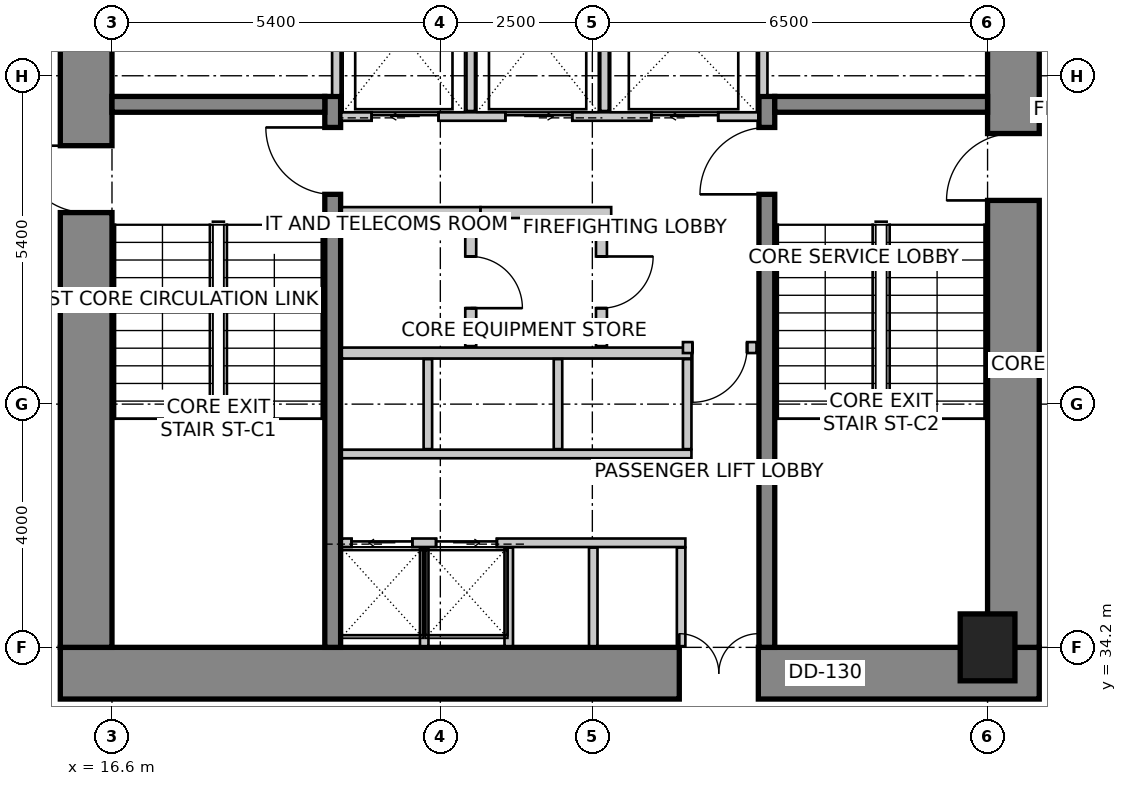
"""IFC4 building model, lengths in metres.
Left out: names, types, materials, properties, quantities, classifications, styles, units other than length and angle.
Written with IfcOpenShell. Run it as: python <this file> out.ifc"""

import sys

from ifc_helpers import new_model, si_unit, direction, frame, frame_2d, origin, origin_2d, place, context, subcontext, project, spatial, rectangle, extrude, source, transform, mapped, element, fill, save


model = new_model("IFC4")
c1 = context("Model", 3, precision=1e-05, world=origin(), true_north=direction((0.0, 1.0)))
c2 = subcontext(c1, "Body", "Model", "MODEL_VIEW")
j1 = project(units=[si_unit("LENGTHUNIT", "METRE"), si_unit("PLANEANGLEUNIT", "RADIAN")], contexts=[c1])
p1 = place(None, origin())
s1 = spatial("IfcSite", under=j1, at=p1, CompositionType="ELEMENT")
p2 = place(p1, origin())
s2 = spatial("IfcBuilding", under=s1, at=p2, CompositionType="ELEMENT")
p3 = place(p2, frame((0.0, 0.0, 83.0)))
s3 = spatial("IfcBuildingStorey", under=s2, at=p3, CompositionType="ELEMENT", Elevation=83.0)
p4 = place(p3, frame((15.75, 33.775, 0.0), z_axis=(0.0, 0.0, 1.0), x_axis=(1.0, 0.0, 0.0)))
e1 = element("IfcWall", 1, at=p4, inside=s3, PredefinedType="SHEAR", context=c2, shape_type="SweptSolid", body=[
    extrude(rectangle(XDim=16.1, YDim=0.85, at=frame_2d((8.05, 0.0))), origin(), (0.0, 0.0, 1.0), 4.0),
])
m1 = source(origin(), c2, "Body", "SweptSolid", [
    extrude(rectangle(XDim=1.3, YDim=2.15, at=frame_2d((0.65, 1.075))), frame((0.0, 0.435, 0.0), z_axis=(0.0, -1.0, 0.0), x_axis=(1.0, 0.0, 0.0)), (0.0, 0.0, 1.0), 0.87),
])
p5 = place(p4, frame((10.18, 0.0, 0.0)))
e2 = element("IfcOpeningElement", 2, at=p5, cuts=e1, PredefinedType="OPENING", context=c2, shape_type="MappedRepresentation", body=[
    mapped(m1, transform((0.0, 0.0, 0.0), scale=1.0)),
])
p6 = place(p3, frame((16.175, 34.2, 0.0), z_axis=(0.0, 0.0, 1.0), x_axis=(0.0, 1.0, 0.0)))
e3 = element("IfcWall", 3, at=p6, inside=s3, PredefinedType="SHEAR", context=c2, shape_type="SweptSolid", body=[
    extrude(rectangle(XDim=11.4, YDim=0.85, at=frame_2d((5.7, 0.0))), origin(), (0.0, 0.0, 1.0), 4.0),
])
m2 = source(origin(), c2, "Body", "SweptSolid", [
    extrude(rectangle(XDim=1.1, YDim=2.15, at=frame_2d((0.55, 1.075))), frame((0.0, 0.435, 0.0), z_axis=(0.0, -1.0, 0.0), x_axis=(1.0, 0.0, 0.0)), (0.0, 0.0, 1.0), 0.87),
])
p7 = place(p6, frame((7.15, 0.0, 0.0)))
e4 = element("IfcOpeningElement", 4, at=p7, cuts=e3, PredefinedType="OPENING", context=c2, shape_type="MappedRepresentation", body=[
    mapped(m2, transform((0.0, 0.0, 0.0), scale=1.0)),
])
p8 = place(p3, frame((31.425, 34.2, 0.0), z_axis=(0.0, 0.0, 1.0), x_axis=(0.0, 1.0, 0.0)))
e5 = element("IfcWall", 5, at=p8, inside=s3, PredefinedType="SHEAR", context=c2, shape_type="SweptSolid", body=[
    extrude(rectangle(XDim=11.4, YDim=0.85, at=frame_2d((5.7, 0.0))), origin(), (0.0, 0.0, 1.0), 4.0),
])
p9 = place(p8, frame((7.35, 0.0, 0.0)))
e6 = element("IfcOpeningElement", 6, at=p9, cuts=e5, PredefinedType="OPENING", context=c2, shape_type="MappedRepresentation", body=[
    mapped(m2, transform((0.0, 0.0, 0.0), scale=1.0)),
])
p10 = place(p3, frame((20.23, 34.2, 0.0), z_axis=(0.0, 0.0, 1.0), x_axis=(0.0, 1.0, 0.0)))
e7 = element("IfcWall", 7, at=p10, inside=s3, PredefinedType="SHEAR", context=c2, shape_type="SweptSolid", body=[
    extrude(rectangle(XDim=9.06, YDim=0.26, at=frame_2d((4.53, 0.0))), origin(), (0.0, 0.0, 1.0), 4.0),
])
m3 = source(origin(), c2, "Body", "SweptSolid", [
    extrude(rectangle(XDim=1.1, YDim=2.15, at=frame_2d((0.55, 1.075))), frame((0.0, 0.14, 0.0), z_axis=(0.0, -1.0, 0.0), x_axis=(1.0, 0.0, 0.0)), (0.0, 0.0, 1.0), 0.28),
])
p11 = place(p10, frame((7.45, 0.0, 0.0)))
e8 = element("IfcOpeningElement", 8, at=p11, cuts=e7, PredefinedType="OPENING", context=c2, shape_type="MappedRepresentation", body=[
    mapped(m3, transform((0.0, 0.0, 0.0), scale=1.0)),
])
p12 = place(p3, frame((27.37, 34.2, 0.0), z_axis=(0.0, 0.0, 1.0), x_axis=(0.0, 1.0, 0.0)))
e9 = element("IfcWall", 9, at=p12, inside=s3, PredefinedType="SHEAR", context=c2, shape_type="SweptSolid", body=[
    extrude(rectangle(XDim=9.06, YDim=0.26, at=frame_2d((4.53, 0.0))), origin(), (0.0, 0.0, 1.0), 4.0),
])
p13 = place(p12, frame((7.45, 0.0, 0.0)))
e10 = element("IfcOpeningElement", 10, at=p13, cuts=e9, PredefinedType="OPENING", context=c2, shape_type="MappedRepresentation", body=[
    mapped(m3, transform((0.0, 0.0, 0.0), scale=1.0)),
])
for number, where, z_axis, x_axis in (
    (11, (16.6, 43.13, 0.0), (0.0, 0.0, 1.0), (1.0, 0.0, 0.0)),
    (12, (27.5, 43.13, 0.0), (0.0, 0.0, 1.0), (1.0, 0.0, 0.0)),
):
    element("IfcWall", number, at=place(p3, frame(where, z_axis=z_axis, x_axis=x_axis)), inside=s3, PredefinedType="SHEAR", context=c2, shape_type="SweptSolid", body=[
        extrude(rectangle(XDim=3.5, YDim=0.26, at=frame_2d((1.75, 0.0))), origin(), (0.0, 0.0, 1.0), 4.0),
    ])
m4 = source(origin(), c2, "Body", "SweptSolid", [
    extrude(rectangle(XDim=0.9, YDim=1.1, at=origin_2d()), origin(), (0.0, 0.0, 1.0), 4.0),
])
p14 = place(p3, frame((31.0, 34.2, 0.0), z_axis=(0.0, 0.0, 1.0), x_axis=(1.0, 0.0, 0.0)))
e13 = element("IfcColumn", 13, at=p14, inside=s3, PredefinedType="COLUMN", context=c2, shape_type="MappedRepresentation", body=[
    mapped(m4, transform((0.0, 0.0, 0.0), scale=1.0)),
])
p15 = place(p3, frame((20.37, 42.93, 0.0), z_axis=(0.0, 0.0, 1.0), x_axis=(1.0, 0.0, 0.0)))
e14 = element("IfcWall", 14, at=p15, inside=s3, PredefinedType="SOLIDWALL", context=c2, shape_type="SweptSolid", body=[
    extrude(rectangle(XDim=6.86, YDim=0.14, at=frame_2d((3.43, 0.0))), origin(), (0.0, 0.0, 1.0), 3.75),
])
m5 = source(origin(), c2, "Body", "SweptSolid", [
    extrude(rectangle(XDim=1.1, YDim=2.15, at=frame_2d((0.55, 1.075))), frame((0.0, 0.08, 0.0), z_axis=(0.0, -1.0, 0.0), x_axis=(1.0, 0.0, 0.0)), (0.0, 0.0, 1.0), 0.16),
])
p16 = place(p15, frame((0.5, 0.0, 0.0)))
e15 = element("IfcOpeningElement", 15, at=p16, cuts=e14, PredefinedType="OPENING", context=c2, shape_type="MappedRepresentation", body=[
    mapped(m5, transform((0.0, 0.0, 0.0), scale=1.0)),
])
p17 = place(p15, frame((2.7, 0.0, 0.0)))
e16 = element("IfcOpeningElement", 16, at=p17, cuts=e14, PredefinedType="OPENING", context=c2, shape_type="MappedRepresentation", body=[
    mapped(m5, transform((0.0, 0.0, 0.0), scale=1.0)),
])
p18 = place(p15, frame((5.1, 0.0, 0.0)))
e17 = element("IfcOpeningElement", 17, at=p18, cuts=e14, PredefinedType="OPENING", context=c2, shape_type="MappedRepresentation", body=[
    mapped(m5, transform((0.0, 0.0, 0.0), scale=1.0)),
])
for number, where, z_axis, x_axis in (
    (18, (20.29, 43.28, 0.0), (0.0, 0.0, 1.0), (0.0, 1.0, 0.0)),
    (19, (27.31, 43.28, 0.0), (0.0, 0.0, 1.0), (0.0, 1.0, 0.0)),
):
    element("IfcWall", number, at=place(p3, frame(where, z_axis=z_axis, x_axis=x_axis)), inside=s3, PredefinedType="SOLIDWALL", context=c2, shape_type="SweptSolid", body=[
        extrude(rectangle(XDim=2.3, YDim=0.14, at=frame_2d((1.15, 0.0))), origin(), (0.0, 0.0, 1.0), 3.75),
    ])
for number, where, z_axis, x_axis in (
    (20, (22.5, 43.02, 0.0), (0.0, 0.0, 1.0), (0.0, 1.0, 0.0)),
    (21, (24.7, 43.02, 0.0), (0.0, 0.0, 1.0), (0.0, 1.0, 0.0)),
):
    element("IfcWall", number, at=place(p3, frame(where, z_axis=z_axis, x_axis=x_axis)), inside=s3, PredefinedType="SOLIDWALL", context=c2, shape_type="SweptSolid", body=[
        extrude(rectangle(XDim=2.56, YDim=0.14, at=frame_2d((1.28, 0.0))), origin(), (0.0, 0.0, 1.0), 3.75),
    ])
p19 = place(p3, frame((20.38, 35.92, 0.0), z_axis=(0.0, 0.0, 1.0), x_axis=(1.0, 0.0, 0.0)))
e22 = element("IfcWall", 22, at=p19, inside=s3, PredefinedType="SOLIDWALL", context=c2, shape_type="SweptSolid", body=[
    extrude(rectangle(XDim=5.65, YDim=0.14, at=frame_2d((2.825, 0.0))), origin(), (0.0, 0.0, 1.0), 3.75),
])
m6 = source(origin(), c2, "Body", "SweptSolid", [
    extrude(rectangle(XDim=1.0, YDim=2.15, at=frame_2d((0.5, 1.075))), frame((0.0, 0.08, 0.0), z_axis=(0.0, -1.0, 0.0), x_axis=(1.0, 0.0, 0.0)), (0.0, 0.0, 1.0), 0.16),
])
p20 = place(p19, frame((0.16, 0.0, 0.0)))
e23 = element("IfcOpeningElement", 23, at=p20, cuts=e22, PredefinedType="OPENING", context=c2, shape_type="MappedRepresentation", body=[
    mapped(m6, transform((0.0, 0.0, 0.0), scale=1.0)),
])
p21 = place(p19, frame((1.55, 0.0, 0.0)))
e24 = element("IfcOpeningElement", 24, at=p21, cuts=e22, PredefinedType="OPENING", context=c2, shape_type="MappedRepresentation", body=[
    mapped(m6, transform((0.0, 0.0, 0.0), scale=1.0)),
])
for number, where, z_axis, x_axis in (
    (25, (25.96, 34.22, 0.0), (0.0, 0.0, 1.0), (0.0, 1.0, 0.0)),
    (26, (21.735, 34.22, 0.0), (0.0, 0.0, 1.0), (0.0, 1.0, 0.0)),
    (27, (23.125, 34.22, 0.0), (0.0, 0.0, 1.0), (0.0, 1.0, 0.0)),
    (28, (24.515, 34.22, 0.0), (0.0, 0.0, 1.0), (0.0, 1.0, 0.0)),
):
    element("IfcWall", number, at=place(p3, frame(where, z_axis=z_axis, x_axis=x_axis)), inside=s3, PredefinedType="SOLIDWALL", context=c2, shape_type="SweptSolid", body=[
        extrude(rectangle(XDim=1.62, YDim=0.14, at=frame_2d((0.81, 0.0))), origin(), (0.0, 0.0, 1.0), 3.042),
    ])
p22 = place(p3, frame((20.38, 37.38, 0.0), z_axis=(0.0, 0.0, 1.0), x_axis=(1.0, 0.0, 0.0)))
e29 = element("IfcWall", 29, at=p22, inside=s3, PredefinedType="SOLIDWALL", context=c2, shape_type="SweptSolid", body=[
    extrude(rectangle(XDim=5.75, YDim=0.14, at=frame_2d((2.875, 0.0))), origin(), (0.0, 0.0, 1.0), 3.75),
])
p23 = place(p3, frame((20.38, 39.04, 0.0), z_axis=(0.0, 0.0, 1.0), x_axis=(1.0, 0.0, 0.0)))
e30 = element("IfcWall", 30, at=p23, inside=s3, PredefinedType="SOLIDWALL", context=c2, shape_type="SweptSolid", body=[
    extrude(rectangle(XDim=5.75, YDim=0.18, at=frame_2d((2.875, 0.0))), origin(), (0.0, 0.0, 1.0), 3.75),
])
for number, where, z_axis, x_axis in (
    (31, (26.06, 37.46, 0.0), (0.0, 0.0, 1.0), (0.0, 1.0, 0.0)),
    (32, (21.795, 37.46, 0.0), (0.0, 0.0, 1.0), (0.0, 1.0, 0.0)),
    (33, (23.935, 37.46, 0.0), (0.0, 0.0, 1.0), (0.0, 1.0, 0.0)),
):
    element("IfcWall", number, at=place(p3, frame(where, z_axis=z_axis, x_axis=x_axis)), inside=s3, PredefinedType="SOLIDWALL", context=c2, shape_type="SweptSolid", body=[
        extrude(rectangle(XDim=1.48, YDim=0.14, at=frame_2d((0.74, 0.0))), origin(), (0.0, 0.0, 1.0), 3.75),
    ])
p24 = place(p3, frame((22.66, 41.35, 0.0), z_axis=(0.0, 0.0, 1.0), x_axis=(-1.0, 0.0, 0.0)))
e34 = element("IfcWall", 34, at=p24, inside=s3, PredefinedType="PARTITIONING", context=c2, shape_type="SweptSolid", body=[
    extrude(rectangle(XDim=2.28, YDim=0.18, at=frame_2d((1.14, 0.0))), origin(), (0.0, 0.0, 1.0), 3.75),
])
p25 = place(p3, frame((24.81, 41.35, 0.0), z_axis=(0.0, 0.0, 1.0), x_axis=(-1.0, 0.0, 0.0)))
e35 = element("IfcWall", 35, at=p25, inside=s3, PredefinedType="PARTITIONING", context=c2, shape_type="SweptSolid", body=[
    extrude(rectangle(XDim=2.148, YDim=0.18, at=frame_2d((1.074, 0.0))), origin(), (0.0, 0.0, 1.0), 3.75),
])
p26 = place(p3, frame((22.5, 41.256, 0.0), z_axis=(0.0, 0.0, 1.0), x_axis=(0.0, -1.0, 0.0)))
e36 = element("IfcWall", 36, at=p26, inside=s3, PredefinedType="PARTITIONING", context=c2, shape_type="SweptSolid", body=[
    extrude(rectangle(XDim=2.106, YDim=0.18, at=frame_2d((1.053, 0.0))), origin(), (0.0, 0.0, 1.0), 3.75),
])
m7 = source(origin(), c2, "Body", "SweptSolid", [
    extrude(rectangle(XDim=0.85, YDim=2.15, at=frame_2d((0.425, 1.075))), frame((0.0, 0.1, 0.0), z_axis=(0.0, -1.0, 0.0), x_axis=(1.0, 0.0, 0.0)), (0.0, 0.0, 1.0), 0.2),
])
p27 = place(p26, frame((0.628, 0.0, 0.0)))
e37 = element("IfcOpeningElement", 37, at=p27, cuts=e36, PredefinedType="OPENING", context=c2, shape_type="MappedRepresentation", body=[
    mapped(m7, transform((0.0, 0.0, 0.0), scale=1.0)),
])
p28 = place(p3, frame((24.65, 41.256, 0.0), z_axis=(0.0, 0.0, 1.0), x_axis=(0.0, -1.0, 0.0)))
e38 = element("IfcWall", 38, at=p28, inside=s3, PredefinedType="PARTITIONING", context=c2, shape_type="SweptSolid", body=[
    extrude(rectangle(XDim=2.106, YDim=0.18, at=frame_2d((1.053, 0.0))), origin(), (0.0, 0.0, 1.0), 3.75),
])
p29 = place(p28, frame((0.628, 0.0, 0.0)))
e39 = element("IfcOpeningElement", 39, at=p29, cuts=e38, PredefinedType="OPENING", context=c2, shape_type="MappedRepresentation", body=[
    mapped(m7, transform((0.0, 0.0, 0.0), scale=1.0)),
])
p30 = place(p3, frame((27.2, 39.13, 0.0), z_axis=(0.0, 0.0, 1.0), x_axis=(-1.0, 0.0, 0.0)))
e40 = element("IfcWall", 40, at=p30, inside=s3, PredefinedType="PARTITIONING", context=c2, shape_type="SweptSolid", body=[
    extrude(rectangle(XDim=1.21, YDim=0.18, at=frame_2d((0.605, 0.0))), origin(), (0.0, 0.0, 1.0), 3.75),
])
m8 = source(origin(), c2, "Body", "SweptSolid", [
    extrude(rectangle(XDim=0.9, YDim=2.15, at=frame_2d((0.45, 1.075))), frame((0.0, 0.1, 0.0), z_axis=(0.0, -1.0, 0.0), x_axis=(1.0, 0.0, 0.0)), (0.0, 0.0, 1.0), 0.2),
])
p31 = place(p30, frame((0.155, 0.0, 0.0)))
e41 = element("IfcOpeningElement", 41, at=p31, cuts=e40, PredefinedType="OPENING", context=c2, shape_type="MappedRepresentation", body=[
    mapped(m8, transform((0.0, 0.0, 0.0), scale=1.0)),
])
m9 = source(origin(), c2, "Body", "SweptSolid", [
    extrude(rectangle(XDim=1.1, YDim=2.15, at=frame_2d((0.55, 1.075))), frame((0.0, 0.025, 0.0), z_axis=(0.0, -1.0, 0.0), x_axis=(1.0, 0.0, 0.0)), (0.0, 0.0, 1.0), 0.05),
])
p32 = place(p16, origin())
e42 = element("IfcDoor", 42, at=p32, inside=s3, OperationType="SLIDING_TO_LEFT", PredefinedType="DOOR", context=c2, shape_type="MappedRepresentation", body=[
    mapped(m9, transform((0.0, 0.0, 0.0), scale=1.0)),
])
fill(e15, e42)
p33 = place(p17, origin())
e43 = element("IfcDoor", 43, at=p33, inside=s3, OperationType="SLIDING_TO_RIGHT", PredefinedType="DOOR", context=c2, shape_type="MappedRepresentation", body=[
    mapped(m9, transform((0.0, 0.0, 0.0), scale=1.0)),
])
fill(e16, e43)
m10 = source(origin(), c2, "Body", "SweptSolid", [
    extrude(rectangle(XDim=1.1, YDim=2.15, at=frame_2d((0.55, 1.075))), frame((0.0, 0.025, 0.0), z_axis=(0.0, -1.0, 0.0), x_axis=(1.0, 0.0, 0.0)), (0.0, 0.0, 1.0), 0.05),
])
p34 = place(p18, origin())
e44 = element("IfcDoor", 44, at=p34, inside=s3, OperationType="SLIDING_TO_LEFT", PredefinedType="DOOR", context=c2, shape_type="MappedRepresentation", body=[
    mapped(m10, transform((0.0, 0.0, 0.0), scale=1.0)),
])
fill(e17, e44)
m11 = source(origin(), c2, "Body", "SweptSolid", [
    extrude(rectangle(XDim=1.0, YDim=2.15, at=frame_2d((0.5, 1.075))), frame((0.0, 0.025, 0.0), z_axis=(0.0, -1.0, 0.0), x_axis=(1.0, 0.0, 0.0)), (0.0, 0.0, 1.0), 0.05),
])
p35 = place(p20, origin())
e45 = element("IfcDoor", 45, at=p35, inside=s3, OperationType="SLIDING_TO_LEFT", PredefinedType="DOOR", context=c2, shape_type="MappedRepresentation", body=[
    mapped(m11, transform((0.0, 0.0, 0.0), scale=1.0)),
])
fill(e23, e45)
p36 = place(p21, origin())
e46 = element("IfcDoor", 46, at=p36, inside=s3, OperationType="SLIDING_TO_RIGHT", PredefinedType="DOOR", context=c2, shape_type="MappedRepresentation", body=[
    mapped(m11, transform((0.0, 0.0, 0.0), scale=1.0)),
])
fill(e24, e46)
m12 = source(origin(), c2, "Body", "SweptSolid", [
    extrude(rectangle(XDim=1.1, YDim=2.15, at=frame_2d((0.55, 1.075))), frame((0.0, 0.025, 0.0), z_axis=(0.0, -1.0, 0.0), x_axis=(1.0, 0.0, 0.0)), (0.0, 0.0, 1.0), 0.05),
])
p37 = place(p11, origin())
e47 = element("IfcDoor", 47, at=p37, inside=s3, OperationType="SINGLE_SWING_RIGHT", PredefinedType="DOOR", context=c2, shape_type="MappedRepresentation", body=[
    mapped(m12, transform((0.0, 0.0, 0.0), scale=1.0)),
])
fill(e8, e47)
p38 = place(p13, origin())
e48 = element("IfcDoor", 48, at=p38, inside=s3, OperationType="SINGLE_SWING_LEFT", PredefinedType="DOOR", context=c2, shape_type="MappedRepresentation", body=[
    mapped(m12, transform((0.0, 0.0, 0.0), scale=1.0)),
])
fill(e10, e48)
p39 = place(p7, origin())
e49 = element("IfcDoor", 49, at=p39, inside=s3, OperationType="SINGLE_SWING_RIGHT", PredefinedType="DOOR", context=c2, shape_type="MappedRepresentation", body=[
    mapped(m12, transform((0.0, 0.0, 0.0), scale=1.0)),
])
fill(e4, e49)
p40 = place(p9, origin())
e50 = element("IfcDoor", 50, at=p40, inside=s3, OperationType="SINGLE_SWING_LEFT", PredefinedType="DOOR", context=c2, shape_type="MappedRepresentation", body=[
    mapped(m12, transform((0.0, 0.0, 0.0), scale=1.0)),
])
fill(e6, e50)
m13 = source(origin(), c2, "Body", "SweptSolid", [
    extrude(rectangle(XDim=1.3, YDim=2.15, at=frame_2d((0.65, 1.075))), frame((0.0, 0.025, 0.0), z_axis=(0.0, -1.0, 0.0), x_axis=(1.0, 0.0, 0.0)), (0.0, 0.0, 1.0), 0.05),
])
p41 = place(p5, origin())
e51 = element("IfcDoor", 51, at=p41, inside=s3, OperationType="DOUBLE_DOOR_SINGLE_SWING", PredefinedType="DOOR", context=c2, shape_type="MappedRepresentation", body=[
    mapped(m13, transform((0.0, 0.0, 0.0), scale=1.0)),
])
fill(e2, e51)
m14 = source(origin(), c2, "Body", "SweptSolid", [
    extrude(rectangle(XDim=0.85, YDim=2.15, at=frame_2d((0.425, 1.075))), frame((0.0, 0.025, 0.0), z_axis=(0.0, -1.0, 0.0), x_axis=(1.0, 0.0, 0.0)), (0.0, 0.0, 1.0), 0.05),
])
p42 = place(p27, origin())
e52 = element("IfcDoor", 52, at=p42, inside=s3, OperationType="SINGLE_SWING_RIGHT", PredefinedType="DOOR", context=c2, shape_type="MappedRepresentation", body=[
    mapped(m14, transform((0.0, 0.0, 0.0), scale=1.0)),
])
fill(e37, e52)
p43 = place(p29, origin())
e53 = element("IfcDoor", 53, at=p43, inside=s3, OperationType="SINGLE_SWING_LEFT", PredefinedType="DOOR", context=c2, shape_type="MappedRepresentation", body=[
    mapped(m14, transform((0.0, 0.0, 0.0), scale=1.0)),
])
fill(e39, e53)
m15 = source(origin(), c2, "Body", "SweptSolid", [
    extrude(rectangle(XDim=0.9, YDim=2.15, at=frame_2d((0.45, 1.075))), frame((0.0, 0.025, 0.0), z_axis=(0.0, -1.0, 0.0), x_axis=(1.0, 0.0, 0.0)), (0.0, 0.0, 1.0), 0.05),
])
p44 = place(p31, origin())
e54 = element("IfcDoor", 54, at=p44, inside=s3, OperationType="SINGLE_SWING_RIGHT", PredefinedType="DOOR", context=c2, shape_type="MappedRepresentation", body=[
    mapped(m15, transform((0.0, 0.0, 0.0), scale=1.0)),
])
fill(e41, e54)
save(model, sys.argv[1])
